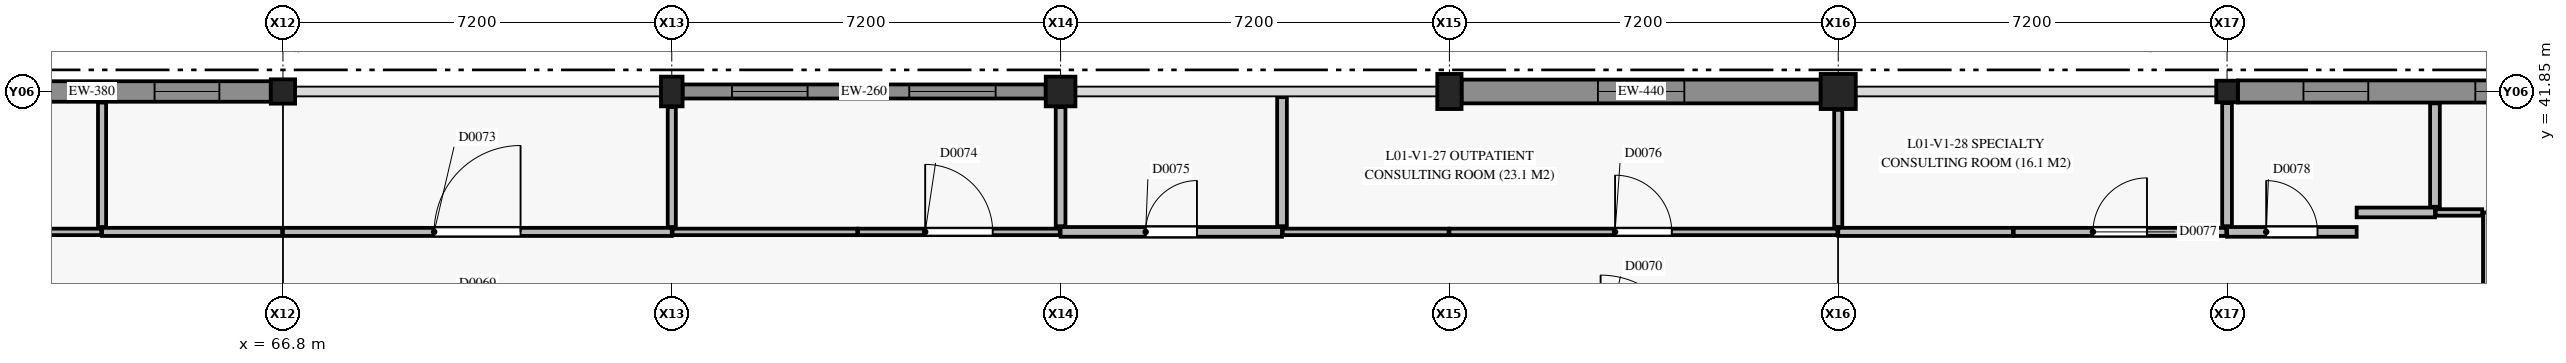
"""IFC4 building model, lengths in metres.
Left out: names, types, materials, properties, quantities, classifications, styles, units other than length and angle.
Written with IfcOpenShell. Run it as: python <this file> out.ifc"""

import sys

from ifc_helpers import new_model, si_unit, direction, frame, frame_2d, origin, origin_2d, place, context, subcontext, project, spatial, rectangle, extrude, element, fill, save


model = new_model("IFC4")
c1 = context("Model", 3, precision=1e-05, world=origin(), true_north=direction((0.0, 1.0)))
c2 = subcontext(c1, "Body", "Model", "MODEL_VIEW")
j1 = project(units=[si_unit("LENGTHUNIT", "METRE"), si_unit("PLANEANGLEUNIT", "RADIAN")], contexts=[c1])
p1 = place(None, origin())
s1 = spatial("IfcSite", under=j1, at=p1, CompositionType="ELEMENT")
p2 = place(p1, origin())
s2 = spatial("IfcBuilding", under=s1, at=p2, CompositionType="ELEMENT")
p3 = place(p2, frame((0.0, 0.0, 4.8)))
s3 = spatial("IfcBuildingStorey", under=s2, at=p3, CompositionType="ELEMENT", Elevation=4.8)
p4 = place(p3, frame((66.8, 41.85, 0.0), z_axis=(0.0, 0.0, 1.0), x_axis=(1.0, 0.0, 0.0)))
e1 = element("IfcColumn", 1, at=p4, inside=s3, PredefinedType="COLUMN", context=c2, shape_type="SweptSolid", body=[
    extrude(rectangle(XDim=0.45, YDim=0.45, at=origin_2d()), origin(), (0.0, 0.0, 1.0), 4.36),
])
p5 = place(p3, frame((74.0, 41.85, 0.0), z_axis=(0.0, 0.0, 1.0), x_axis=(1.0, 0.0, 0.0)))
e2 = element("IfcColumn", 2, at=p5, inside=s3, PredefinedType="COLUMN", context=c2, shape_type="SweptSolid", body=[
    extrude(rectangle(XDim=0.4, YDim=0.55, at=origin_2d()), origin(), (0.0, 0.0, 1.0), 4.36),
])
p6 = place(p3, frame((81.2, 41.85, 0.0), z_axis=(0.0, 0.0, 1.0), x_axis=(1.0, 0.0, 0.0)))
e3 = element("IfcColumn", 3, at=p6, inside=s3, PredefinedType="COLUMN", context=c2, shape_type="SweptSolid", body=[
    extrude(rectangle(XDim=0.55, YDim=0.55, at=origin_2d()), origin(), (0.0, 0.0, 1.0), 4.36),
])
p7 = place(p3, frame((88.4, 41.85, 0.0), z_axis=(0.0, 0.0, 1.0), x_axis=(1.0, 0.0, 0.0)))
e4 = element("IfcColumn", 4, at=p7, inside=s3, PredefinedType="COLUMN", context=c2, shape_type="SweptSolid", body=[
    extrude(rectangle(XDim=0.45, YDim=0.65, at=origin_2d()), origin(), (0.0, 0.0, 1.0), 4.36),
])
p8 = place(p3, frame((95.6, 41.85, 0.0), z_axis=(0.0, 0.0, 1.0), x_axis=(1.0, 0.0, 0.0)))
e5 = element("IfcColumn", 5, at=p8, inside=s3, PredefinedType="COLUMN", context=c2, shape_type="SweptSolid", body=[
    extrude(rectangle(XDim=0.65, YDim=0.65, at=origin_2d()), origin(), (0.0, 0.0, 1.0), 4.36),
])
p9 = place(p3, frame((102.8, 41.85, 0.0), z_axis=(0.0, 0.0, 1.0), x_axis=(1.0, 0.0, 0.0)))
e6 = element("IfcColumn", 6, at=p9, inside=s3, PredefinedType="COLUMN", context=c2, shape_type="SweptSolid", body=[
    extrude(rectangle(XDim=0.4, YDim=0.4, at=origin_2d()), origin(), (0.0, 0.0, 1.0), 4.36),
])
p10 = place(p3, frame((59.95, 41.85, 0.0), z_axis=(0.0, 0.0, 1.0), x_axis=(1.0, 0.0, 0.0)))
e7 = element("IfcWall", 7, at=p10, inside=s3, PredefinedType="USERDEFINED", context=c2, shape_type="SweptSolid", body=[
    extrude(rectangle(XDim=6.625, YDim=0.38, at=frame_2d((3.312, 0.0))), origin(), (0.0, 0.0, 1.0), 3.3),
])
p11 = place(p10, frame((1.215, 0.0, 0.9)))
e8 = element("IfcOpeningElement", 8, at=p11, cuts=e7, PredefinedType="OPENING", context=c2, shape_type="SweptSolid", body=[
    extrude(rectangle(XDim=1.05, YDim=1.8, at=frame_2d((0.525, 0.9))), frame((0.0, 0.2, 0.0), z_axis=(0.0, -1.0, 0.0), x_axis=(1.0, 0.0, 0.0)), (0.0, 0.0, 1.0), 0.4),
])
p12 = place(p10, frame((4.472, 0.0, 0.9)))
e9 = element("IfcOpeningElement", 9, at=p12, cuts=e7, PredefinedType="OPENING", context=c2, shape_type="SweptSolid", body=[
    extrude(rectangle(XDim=1.2, YDim=1.8, at=frame_2d((0.6, 0.9))), frame((0.0, 0.2, 0.0), z_axis=(0.0, -1.0, 0.0), x_axis=(1.0, 0.0, 0.0)), (0.0, 0.0, 1.0), 0.4),
])
p13 = place(p3, frame((74.2, 41.85, 0.0), z_axis=(0.0, 0.0, 1.0), x_axis=(1.0, 0.0, 0.0)))
e10 = element("IfcWall", 10, at=p13, inside=s3, PredefinedType="SOLIDWALL", context=c2, shape_type="SweptSolid", body=[
    extrude(rectangle(XDim=6.725, YDim=0.26, at=frame_2d((3.363, 0.0))), origin(), (0.0, 0.0, 1.0), 3.38),
])
p14 = place(p13, frame((0.915, 0.0, 0.9)))
e11 = element("IfcOpeningElement", 11, at=p14, cuts=e10, PredefinedType="OPENING", context=c2, shape_type="SweptSolid", body=[
    extrude(rectangle(XDim=1.4, YDim=1.8, at=frame_2d((0.7, 0.9))), frame((0.0, 0.14, 0.0), z_axis=(0.0, -1.0, 0.0), x_axis=(1.0, 0.0, 0.0)), (0.0, 0.0, 1.0), 0.28),
])
p15 = place(p13, frame((4.198, 0.0, 0.9)))
e12 = element("IfcOpeningElement", 12, at=p15, cuts=e10, PredefinedType="OPENING", context=c2, shape_type="SweptSolid", body=[
    extrude(rectangle(XDim=1.6, YDim=1.8, at=frame_2d((0.8, 0.9))), frame((0.0, 0.14, 0.0), z_axis=(0.0, -1.0, 0.0), x_axis=(1.0, 0.0, 0.0)), (0.0, 0.0, 1.0), 0.28),
])
p16 = place(p3, frame((88.625, 41.85, 0.0), z_axis=(0.0, 0.0, 1.0), x_axis=(1.0, 0.0, 0.0)))
e13 = element("IfcWall", 13, at=p16, inside=s3, PredefinedType="USERDEFINED", context=c2, shape_type="SweptSolid", body=[
    extrude(rectangle(XDim=6.65, YDim=0.44, at=frame_2d((3.325, 0.0))), origin(), (0.0, 0.0, 1.0), 3.38),
])
p17 = place(p16, frame((2.525, 0.0, 0.6)))
e14 = element("IfcOpeningElement", 14, at=p17, cuts=e13, PredefinedType="OPENING", context=c2, shape_type="SweptSolid", body=[
    extrude(rectangle(XDim=1.6, YDim=2.2, at=frame_2d((0.8, 1.1))), frame((0.0, 0.23, 0.0), z_axis=(0.0, -1.0, 0.0), x_axis=(1.0, 0.0, 0.0)), (0.0, 0.0, 1.0), 0.46),
])
p18 = place(p3, frame((103.0, 41.85, 0.0), z_axis=(0.0, 0.0, 1.0), x_axis=(1.0, 0.0, 0.0)))
e15 = element("IfcWall", 15, at=p18, inside=s3, PredefinedType="USERDEFINED", context=c2, shape_type="SweptSolid", body=[
    extrude(rectangle(XDim=6.625, YDim=0.41, at=frame_2d((3.312, 0.0))), origin(), (0.0, 0.0, 1.0), 3.38),
])
p19 = place(p18, frame((1.215, 0.0, 0.9)))
e16 = element("IfcOpeningElement", 16, at=p19, cuts=e15, PredefinedType="OPENING", context=c2, shape_type="SweptSolid", body=[
    extrude(rectangle(XDim=1.2, YDim=1.5, at=frame_2d((0.6, 0.75))), frame((0.0, 0.215, 0.0), z_axis=(0.0, -1.0, 0.0), x_axis=(1.0, 0.0, 0.0)), (0.0, 0.0, 1.0), 0.43),
])
p20 = place(p18, frame((4.397, 0.0, 0.9)))
e17 = element("IfcOpeningElement", 17, at=p20, cuts=e15, PredefinedType="OPENING", context=c2, shape_type="SweptSolid", body=[
    extrude(rectangle(XDim=1.5, YDim=1.5, at=frame_2d((0.75, 0.75))), frame((0.0, 0.215, 0.0), z_axis=(0.0, -1.0, 0.0), x_axis=(1.0, 0.0, 0.0)), (0.0, 0.0, 1.0), 0.43),
])
p21 = place(p3, frame((81.2, 39.25, 0.0), z_axis=(0.0, 0.0, 1.0), x_axis=(1.0, 0.0, 0.0)))
e18 = element("IfcWall", 18, at=p21, inside=s3, PredefinedType="PLUMBINGWALL", context=c2, shape_type="SweptSolid", body=[
    extrude(rectangle(XDim=4.1, YDim=0.18, at=frame_2d((2.05, 0.0))), origin(), (0.0, 0.0, 1.0), 3.95),
])
p22 = place(p21, frame((1.575, 0.0, 0.0)))
e19 = element("IfcOpeningElement", 19, at=p22, cuts=e18, PredefinedType="OPENING", context=c2, shape_type="SweptSolid", body=[
    extrude(rectangle(XDim=0.95, YDim=2.1, at=frame_2d((0.475, 1.05))), frame((0.0, 0.1, 0.0), z_axis=(0.0, -1.0, 0.0), x_axis=(1.0, 0.0, 0.0)), (0.0, 0.0, 1.0), 0.2),
])
p23 = place(p3, frame((105.2, 39.61, 0.0), z_axis=(0.0, 0.0, 1.0), x_axis=(1.0, 0.0, 0.0)))
e20 = element("IfcWall", 20, at=p23, inside=s3, PredefinedType="PLUMBINGWALL", context=c2, shape_type="SweptSolid", body=[
    extrude(rectangle(XDim=1.45, YDim=0.18, at=frame_2d((0.725, 0.0))), origin(), (0.0, 0.0, 1.0), 3.95),
])
p24 = place(p3, frame((102.8, 39.25, 0.0), z_axis=(0.0, 0.0, 1.0), x_axis=(1.0, 0.0, 0.0)))
e21 = element("IfcWall", 21, at=p24, inside=s3, PredefinedType="PLUMBINGWALL", context=c2, shape_type="SweptSolid", body=[
    extrude(rectangle(XDim=2.4, YDim=0.18, at=frame_2d((1.2, 0.0))), origin(), (0.0, 0.0, 1.0), 3.95),
])
p25 = place(p24, frame((0.725, 0.0, 0.0)))
e22 = element("IfcOpeningElement", 22, at=p25, cuts=e21, PredefinedType="OPENING", context=c2, shape_type="SweptSolid", body=[
    extrude(rectangle(XDim=0.95, YDim=2.1, at=frame_2d((0.475, 1.05))), frame((0.0, 0.1, 0.0), z_axis=(0.0, -1.0, 0.0), x_axis=(1.0, 0.0, 0.0)), (0.0, 0.0, 1.0), 0.2),
])
p26 = place(p3, frame((66.8, 39.25, 0.0), z_axis=(0.0, 0.0, 1.0), x_axis=(1.0, 0.0, 0.0)))
e23 = element("IfcWall", 23, at=p26, inside=s3, PredefinedType="PARTITIONING", context=c2, shape_type="SweptSolid", body=[
    extrude(rectangle(XDim=7.2, YDim=0.15, at=frame_2d((3.6, 0.0))), origin(), (0.0, 0.0, 1.0), 3.95),
])
p27 = place(p26, frame((2.8, 0.0, 0.0)))
e24 = element("IfcOpeningElement", 24, at=p27, cuts=e23, PredefinedType="OPENING", context=c2, shape_type="SweptSolid", body=[
    extrude(rectangle(XDim=1.6, YDim=2.25, at=frame_2d((0.8, 1.125))), frame((0.0, 0.085, 0.0), z_axis=(0.0, -1.0, 0.0), x_axis=(1.0, 0.0, 0.0)), (0.0, 0.0, 1.0), 0.17),
])
p28 = place(p3, frame((63.45, 39.25, 0.0), z_axis=(0.0, 0.0, 1.0), x_axis=(1.0, 0.0, 0.0)))
e25 = element("IfcWall", 25, at=p28, inside=s3, PredefinedType="PARTITIONING", context=c2, shape_type="SweptSolid", body=[
    extrude(rectangle(XDim=3.335, YDim=0.15, at=frame_2d((1.667, 0.0))), origin(), (0.0, 0.0, 1.0), 3.95),
])
p29 = place(p3, frame((98.85, 39.25, 0.0), z_axis=(0.0, 0.0, 1.0), x_axis=(1.0, 0.0, 0.0)))
e26 = element("IfcWall", 26, at=p29, inside=s3, PredefinedType="PARTITIONING", context=c2, shape_type="SweptSolid", body=[
    extrude(rectangle(XDim=3.935, YDim=0.15, at=frame_2d((1.967, 0.0))), origin(), (0.0, 0.0, 1.0), 3.95),
])
p30 = place(p29, frame((1.468, 0.0, 0.0)))
e27 = element("IfcOpeningElement", 27, at=p30, cuts=e26, PredefinedType="OPENING", context=c2, shape_type="SweptSolid", body=[
    extrude(rectangle(XDim=1.0, YDim=2.15, at=frame_2d((0.5, 1.075))), frame((0.0, 0.085, 0.0), z_axis=(0.0, -1.0, 0.0), x_axis=(1.0, 0.0, 0.0)), (0.0, 0.0, 1.0), 0.17),
])
p31 = place(p3, frame((95.6, 39.25, 0.0), z_axis=(0.0, 0.0, 1.0), x_axis=(1.0, 0.0, 0.0)))
e28 = element("IfcWall", 28, at=p31, inside=s3, PredefinedType="PARTITIONING", context=c2, shape_type="SweptSolid", body=[
    extrude(rectangle(XDim=3.235, YDim=0.15, at=frame_2d((1.617, 0.0))), origin(), (0.0, 0.0, 1.0), 3.95),
])
p32 = place(p3, frame((107.6, 29.575, 0.0), z_axis=(0.0, 0.0, 1.0), x_axis=(0.0, 1.0, 0.0)))
e29 = element("IfcWall", 29, at=p32, inside=s3, PredefinedType="PARTITIONING", context=c2, shape_type="SweptSolid", body=[
    extrude(rectangle(XDim=10.035, YDim=0.12, at=frame_2d((5.018, 0.0))), origin(), (0.0, 0.0, 1.0), 3.22),
])
p33 = place(p32, frame((4.393, 0.0, 0.0)))
e30 = element("IfcOpeningElement", 30, at=p33, cuts=e29, PredefinedType="OPENING", context=c2, shape_type="SweptSolid", body=[
    extrude(rectangle(XDim=1.25, YDim=2.15, at=frame_2d((0.625, 1.075))), frame((0.0, 0.07, 0.0), z_axis=(0.0, -1.0, 0.0), x_axis=(1.0, 0.0, 0.0)), (0.0, 0.0, 1.0), 0.14),
])
p34 = place(p3, frame((106.665, 39.61, 0.0), z_axis=(0.0, 0.0, 1.0), x_axis=(1.0, 0.0, 0.0)))
e31 = element("IfcWall", 31, at=p34, inside=s3, PredefinedType="PARTITIONING", context=c2, shape_type="SweptSolid", body=[
    extrude(rectangle(XDim=0.86, YDim=0.12, at=frame_2d((0.43, 0.0))), origin(), (0.0, 0.0, 1.0), 3.95),
])
p35 = place(p3, frame((59.615, 39.25, 0.0), z_axis=(0.0, 0.0, 1.0), x_axis=(1.0, 0.0, 0.0)))
e32 = element("IfcWall", 32, at=p35, inside=s3, PredefinedType="PARTITIONING", context=c2, shape_type="SweptSolid", body=[
    extrude(rectangle(XDim=3.82, YDim=0.12, at=frame_2d((1.91, 0.0))), origin(), (0.0, 0.0, 1.0), 3.95),
])
p36 = place(p35, frame((1.435, 0.0, 0.0)))
e33 = element("IfcOpeningElement", 33, at=p36, cuts=e32, PredefinedType="OPENING", context=c2, shape_type="SweptSolid", body=[
    extrude(rectangle(XDim=0.95, YDim=2.1, at=frame_2d((0.475, 1.05))), frame((0.0, 0.07, 0.0), z_axis=(0.0, -1.0, 0.0), x_axis=(1.0, 0.0, 0.0)), (0.0, 0.0, 1.0), 0.14),
])
p37 = place(p3, frame((77.45, 39.25, 0.0), z_axis=(0.0, 0.0, 1.0), x_axis=(1.0, 0.0, 0.0)))
e34 = element("IfcWall", 34, at=p37, inside=s3, PredefinedType="PARTITIONING", context=c2, shape_type="SweptSolid", body=[
    extrude(rectangle(XDim=3.735, YDim=0.12, at=frame_2d((1.868, 0.0))), origin(), (0.0, 0.0, 1.0), 3.95),
])
p38 = place(p37, frame((1.242, 0.0, 0.0)))
e35 = element("IfcOpeningElement", 35, at=p38, cuts=e34, PredefinedType="OPENING", context=c2, shape_type="SweptSolid", body=[
    extrude(rectangle(XDim=1.25, YDim=2.15, at=frame_2d((0.625, 1.075))), frame((0.0, 0.07, 0.0), z_axis=(0.0, -1.0, 0.0), x_axis=(1.0, 0.0, 0.0)), (0.0, 0.0, 1.0), 0.14),
])
p39 = place(p3, frame((74.015, 39.25, 0.0), z_axis=(0.0, 0.0, 1.0), x_axis=(1.0, 0.0, 0.0)))
e36 = element("IfcWall", 36, at=p39, inside=s3, PredefinedType="PARTITIONING", context=c2, shape_type="SweptSolid", body=[
    extrude(rectangle(XDim=3.42, YDim=0.12, at=frame_2d((1.71, 0.0))), origin(), (0.0, 0.0, 1.0), 3.95),
])
p40 = place(p3, frame((88.4, 39.25, 0.0), z_axis=(0.0, 0.0, 1.0), x_axis=(1.0, 0.0, 0.0)))
e37 = element("IfcWall", 37, at=p40, inside=s3, PredefinedType="PARTITIONING", context=c2, shape_type="SweptSolid", body=[
    extrude(rectangle(XDim=7.185, YDim=0.12, at=frame_2d((3.593, 0.0))), origin(), (0.0, 0.0, 1.0), 3.95),
])
p41 = place(p40, frame((3.067, 0.0, 0.0)))
e38 = element("IfcOpeningElement", 38, at=p41, cuts=e37, PredefinedType="OPENING", context=c2, shape_type="SweptSolid", body=[
    extrude(rectangle(XDim=1.05, YDim=2.15, at=frame_2d((0.525, 1.075))), frame((0.0, 0.07, 0.0), z_axis=(0.0, -1.0, 0.0), x_axis=(1.0, 0.0, 0.0)), (0.0, 0.0, 1.0), 0.14),
])
p42 = place(p3, frame((85.315, 39.25, 0.0), z_axis=(0.0, 0.0, 1.0), x_axis=(1.0, 0.0, 0.0)))
e39 = element("IfcWall", 39, at=p42, inside=s3, PredefinedType="PARTITIONING", context=c2, shape_type="SweptSolid", body=[
    extrude(rectangle(XDim=3.07, YDim=0.12, at=frame_2d((1.535, 0.0))), origin(), (0.0, 0.0, 1.0), 3.95),
])
p43 = place(p3, frame((106.65, 39.715, 0.0), z_axis=(0.0, 0.0, 1.0), x_axis=(0.0, 1.0, 0.0)))
e40 = element("IfcWall", 40, at=p43, inside=s3, PredefinedType="PLUMBINGWALL", context=c2, shape_type="SweptSolid", body=[
    extrude(rectangle(XDim=1.915, YDim=0.18, at=frame_2d((0.958, 0.0))), origin(), (0.0, 0.0, 1.0), 3.95),
])
p44 = place(p3, frame((81.2, 39.355, 0.0), z_axis=(0.0, 0.0, 1.0), x_axis=(0.0, 1.0, 0.0)))
e41 = element("IfcWall", 41, at=p44, inside=s3, PredefinedType="PLUMBINGWALL", context=c2, shape_type="SweptSolid", body=[
    extrude(rectangle(XDim=2.205, YDim=0.18, at=frame_2d((1.103, 0.0))), origin(), (0.0, 0.0, 1.0), 3.95),
])
p45 = place(p3, frame((85.3, 39.355, 0.0), z_axis=(0.0, 0.0, 1.0), x_axis=(0.0, 1.0, 0.0)))
e42 = element("IfcWall", 42, at=p45, inside=s3, PredefinedType="PLUMBINGWALL", context=c2, shape_type="SweptSolid", body=[
    extrude(rectangle(XDim=2.39, YDim=0.18, at=frame_2d((1.195, 0.0))), origin(), (0.0, 0.0, 1.0), 3.95),
])
p46 = place(p3, frame((102.8, 39.355, 0.0), z_axis=(0.0, 0.0, 1.0), x_axis=(0.0, 1.0, 0.0)))
e43 = element("IfcWall", 43, at=p46, inside=s3, PredefinedType="PLUMBINGWALL", context=c2, shape_type="SweptSolid", body=[
    extrude(rectangle(XDim=2.28, YDim=0.18, at=frame_2d((1.14, 0.0))), origin(), (0.0, 0.0, 1.0), 3.95),
])
p47 = place(p3, frame((63.45, 39.34, 0.0), z_axis=(0.0, 0.0, 1.0), x_axis=(0.0, 1.0, 0.0)))
e44 = element("IfcWall", 44, at=p47, inside=s3, PredefinedType="PARTITIONING", context=c2, shape_type="SweptSolid", body=[
    extrude(rectangle(XDim=2.305, YDim=0.15, at=frame_2d((1.152, 0.0))), origin(), (0.0, 0.0, 1.0), 3.95),
])
p48 = place(p3, frame((74.0, 39.34, 0.0), z_axis=(0.0, 0.0, 1.0), x_axis=(0.0, 1.0, 0.0)))
e45 = element("IfcWall", 45, at=p48, inside=s3, PredefinedType="PARTITIONING", context=c2, shape_type="SweptSolid", body=[
    extrude(rectangle(XDim=2.22, YDim=0.15, at=frame_2d((1.11, 0.0))), origin(), (0.0, 0.0, 1.0), 3.95),
])
p49 = place(p3, frame((95.6, 39.34, 0.0), z_axis=(0.0, 0.0, 1.0), x_axis=(0.0, 1.0, 0.0)))
e46 = element("IfcWall", 46, at=p49, inside=s3, PredefinedType="PARTITIONING", context=c2, shape_type="SweptSolid", body=[
    extrude(rectangle(XDim=2.17, YDim=0.15, at=frame_2d((1.085, 0.0))), origin(), (0.0, 0.0, 1.0), 3.95),
])
p50 = place(p12, origin())
e47 = element("IfcWindow", 47, at=p50, inside=s3, PartitioningType="SINGLE_PANEL", PredefinedType="WINDOW", context=c2, shape_type="SweptSolid", body=[
    extrude(rectangle(XDim=1.2, YDim=1.8, at=frame_2d((0.6, 0.9))), frame((0.0, 0.03, 0.0), z_axis=(0.0, -1.0, 0.0), x_axis=(1.0, 0.0, 0.0)), (0.0, 0.0, 1.0), 0.06),
])
fill(e9, e47)
p51 = place(p14, origin())
e48 = element("IfcWindow", 48, at=p51, inside=s3, PartitioningType="SINGLE_PANEL", PredefinedType="WINDOW", context=c2, shape_type="SweptSolid", body=[
    extrude(rectangle(XDim=1.4, YDim=1.8, at=frame_2d((0.7, 0.9))), frame((0.0, 0.03, 0.0), z_axis=(0.0, -1.0, 0.0), x_axis=(1.0, 0.0, 0.0)), (0.0, 0.0, 1.0), 0.06),
])
fill(e11, e48)
p52 = place(p15, origin())
e49 = element("IfcWindow", 49, at=p52, inside=s3, PartitioningType="SINGLE_PANEL", PredefinedType="WINDOW", context=c2, shape_type="SweptSolid", body=[
    extrude(rectangle(XDim=1.6, YDim=1.8, at=frame_2d((0.8, 0.9))), frame((0.0, 0.03, 0.0), z_axis=(0.0, -1.0, 0.0), x_axis=(1.0, 0.0, 0.0)), (0.0, 0.0, 1.0), 0.06),
])
fill(e12, e49)
p53 = place(p17, origin())
e50 = element("IfcWindow", 50, at=p53, inside=s3, PartitioningType="SINGLE_PANEL", PredefinedType="WINDOW", context=c2, shape_type="SweptSolid", body=[
    extrude(rectangle(XDim=1.6, YDim=2.2, at=frame_2d((0.8, 1.1))), frame((0.0, 0.03, 0.0), z_axis=(0.0, -1.0, 0.0), x_axis=(1.0, 0.0, 0.0)), (0.0, 0.0, 1.0), 0.06),
])
fill(e14, e50)
p54 = place(p19, origin())
e51 = element("IfcWindow", 51, at=p54, inside=s3, PartitioningType="SINGLE_PANEL", PredefinedType="WINDOW", context=c2, shape_type="SweptSolid", body=[
    extrude(rectangle(XDim=1.2, YDim=1.5, at=frame_2d((0.6, 0.75))), frame((0.0, 0.03, 0.0), z_axis=(0.0, -1.0, 0.0), x_axis=(1.0, 0.0, 0.0)), (0.0, 0.0, 1.0), 0.06),
])
fill(e16, e51)
p55 = place(p20, origin())
e52 = element("IfcWindow", 52, at=p55, inside=s3, PartitioningType="SINGLE_PANEL", PredefinedType="WINDOW", context=c2, shape_type="SweptSolid", body=[
    extrude(rectangle(XDim=1.5, YDim=1.5, at=frame_2d((0.75, 0.75))), frame((0.0, 0.03, 0.0), z_axis=(0.0, -1.0, 0.0), x_axis=(1.0, 0.0, 0.0)), (0.0, 0.0, 1.0), 0.06),
])
fill(e17, e52)
p56 = place(p27, origin())
e53 = element("IfcDoor", 53, at=p56, inside=s3, OperationType="SINGLE_SWING_RIGHT", PredefinedType="DOOR", context=c2, shape_type="SweptSolid", body=[
    extrude(rectangle(XDim=1.6, YDim=2.25, at=frame_2d((0.8, 1.125))), frame((0.0, 0.025, 0.0), z_axis=(0.0, -1.0, 0.0), x_axis=(1.0, 0.0, 0.0)), (0.0, 0.0, 1.0), 0.05),
])
fill(e24, e53)
p57 = place(p38, origin())
e54 = element("IfcDoor", 54, at=p57, inside=s3, OperationType="SINGLE_SWING_LEFT", PredefinedType="DOOR", context=c2, shape_type="SweptSolid", body=[
    extrude(rectangle(XDim=1.25, YDim=2.15, at=frame_2d((0.625, 1.075))), frame((0.0, 0.025, 0.0), z_axis=(0.0, -1.0, 0.0), x_axis=(1.0, 0.0, 0.0)), (0.0, 0.0, 1.0), 0.05),
])
fill(e35, e54)
p58 = place(p22, origin())
e55 = element("IfcDoor", 55, at=p58, inside=s3, OperationType="SINGLE_SWING_RIGHT", PredefinedType="DOOR", context=c2, shape_type="SweptSolid", body=[
    extrude(rectangle(XDim=0.95, YDim=2.1, at=frame_2d((0.475, 1.05))), frame((0.0, 0.025, 0.0), z_axis=(0.0, -1.0, 0.0), x_axis=(1.0, 0.0, 0.0)), (0.0, 0.0, 1.0), 0.05),
])
fill(e19, e55)
p59 = place(p41, origin())
e56 = element("IfcDoor", 56, at=p59, inside=s3, OperationType="SINGLE_SWING_LEFT", PredefinedType="DOOR", context=c2, shape_type="SweptSolid", body=[
    extrude(rectangle(XDim=1.05, YDim=2.15, at=frame_2d((0.525, 1.075))), frame((0.0, 0.025, 0.0), z_axis=(0.0, -1.0, 0.0), x_axis=(1.0, 0.0, 0.0)), (0.0, 0.0, 1.0), 0.05),
])
fill(e38, e56)
p60 = place(p30, origin())
e57 = element("IfcDoor", 57, at=p60, inside=s3, OperationType="SINGLE_SWING_RIGHT", PredefinedType="DOOR", context=c2, shape_type="SweptSolid", body=[
    extrude(rectangle(XDim=1.0, YDim=2.15, at=frame_2d((0.5, 1.075))), frame((0.0, 0.025, 0.0), z_axis=(0.0, -1.0, 0.0), x_axis=(1.0, 0.0, 0.0)), (0.0, 0.0, 1.0), 0.05),
])
fill(e27, e57)
p61 = place(p25, origin())
e58 = element("IfcDoor", 58, at=p61, inside=s3, OperationType="SINGLE_SWING_LEFT", PredefinedType="DOOR", context=c2, shape_type="SweptSolid", body=[
    extrude(rectangle(XDim=0.95, YDim=2.1, at=frame_2d((0.475, 1.05))), frame((0.0, 0.025, 0.0), z_axis=(0.0, -1.0, 0.0), x_axis=(1.0, 0.0, 0.0)), (0.0, 0.0, 1.0), 0.05),
])
fill(e22, e58)
save(model, sys.argv[1])
